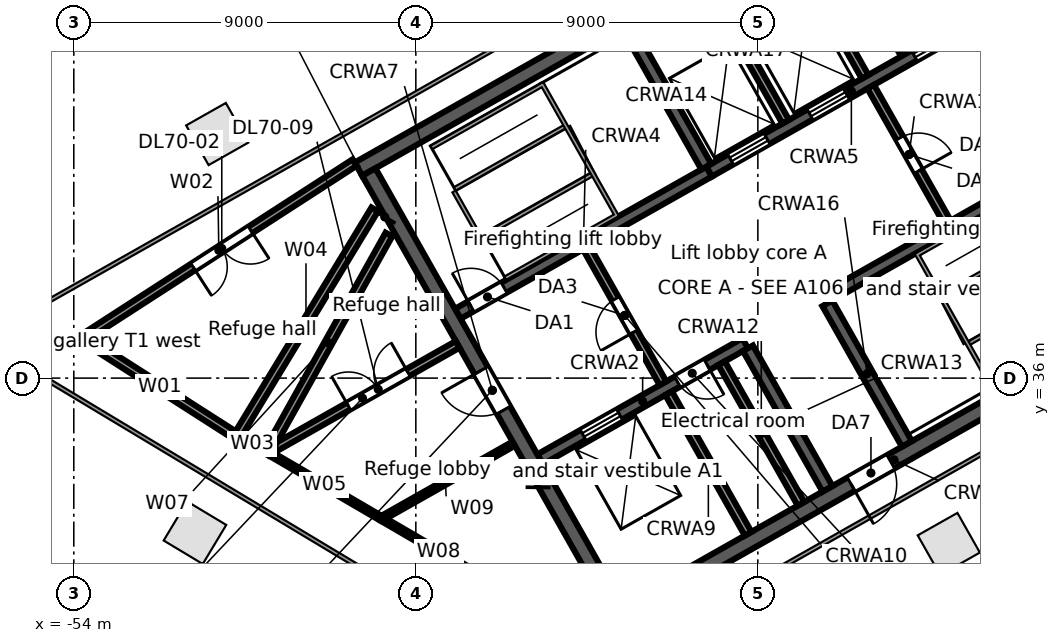
"""IFC4 building model, lengths in metres.
Left out: names, types, materials, properties, quantities, classifications, styles, units other than length and angle.
Written with IfcOpenShell. Run it as: python <this file> out.ifc"""

import sys

from ifc_helpers import new_model, si_unit, direction, frame, frame_2d, origin, origin_2d, place, context, subcontext, project, spatial, rectangle, extrude, element, fill, save


model = new_model("IFC4")
c1 = context("Model", 3, precision=1e-05, world=origin(), true_north=direction((0.0, 1.0)))
c2 = subcontext(c1, "Body", "Model", "MODEL_VIEW")
j1 = project(units=[si_unit("LENGTHUNIT", "METRE"), si_unit("PLANEANGLEUNIT", "RADIAN")], contexts=[c1])
p1 = place(None, origin())
s1 = spatial("IfcSite", under=j1, at=p1, CompositionType="ELEMENT")
p2 = place(p1, origin())
s2 = spatial("IfcBuilding", under=s1, at=p2, CompositionType="ELEMENT")
p3 = place(p2, frame((0.0, 0.0, 312.1)))
s3 = spatial("IfcBuildingStorey", under=s2, at=p3, CompositionType="ELEMENT", Elevation=312.1)
for number, where, z_axis, x_axis in (
    (1, (-50.226, 42.423, 0.0), (0.0, 0.0, 1.0), (-0.87, -0.492, 0.0)),
    (2, (-50.812, 31.931, 0.0), (0.0, 0.0, 1.0), (0.857, -0.515, 0.0)),
    (3, (-30.976, 31.635, 0.0), (0.0, 0.0, 1.0), (0.87, 0.492, 0.0)),
):
    element("IfcColumn", number, at=place(p3, frame(where, z_axis=z_axis, x_axis=x_axis)), inside=s3, PredefinedType="COLUMN", context=c2, shape_type="SweptSolid", body=[
        extrude(rectangle(XDim=1.2, YDim=1.2, at=origin_2d()), origin(), (0.0, 0.0, 1.0), 4.4),
    ])
p4 = place(p3, frame((-39.813, 29.662, 0.0), z_axis=(0.0, 0.0, 1.0), x_axis=(0.870350116061, 0.492433422375, 0.0)))
e4 = element("IfcWall", 4, at=p4, inside=s3, PredefinedType="SOLIDWALL", context=c2, shape_type="SweptSolid", body=[
    extrude(rectangle(XDim=17.0, YDim=0.4, at=frame_2d((8.5, 0.0))), origin(), (0.0, 0.0, 1.0), 4.12),
])
p5 = place(p4, frame((7.2, 0.0, 0.0)))
e5 = element("IfcOpeningElement", 5, at=p5, cuts=e4, PredefinedType="OPENING", context=c2, shape_type="SweptSolid", body=[
    extrude(rectangle(XDim=1.2, YDim=2.1, at=frame_2d((0.6, 1.05))), frame((0.0, 0.21, 0.0), z_axis=(0.0, -1.0, 0.0), x_axis=(1.0, 0.0, 0.0)), (0.0, 0.0, 1.0), 0.42),
])
p6 = place(p3, frame((-41.73, 33.863, 0.0), z_axis=(0.0, 0.0, 1.0), x_axis=(0.870350800578, 0.492432212525, 0.0)))
e6 = element("IfcWall", 6, at=p6, inside=s3, PredefinedType="SOLIDWALL", context=c2, shape_type="SweptSolid", body=[
    extrude(rectangle(XDim=6.2, YDim=0.3, at=frame_2d((3.1, 0.0))), origin(), (0.0, 0.0, 1.0), 4.12),
])
p7 = place(p6, frame((1.3, 0.0, 0.0)))
e7 = element("IfcOpeningElement", 7, at=p7, cuts=e6, PredefinedType="OPENING", context=c2, shape_type="SweptSolid", body=[
    extrude(rectangle(XDim=1.1, YDim=2.1, at=frame_2d((0.55, 1.05))), frame((0.0, 0.16, 0.0), z_axis=(0.0, -1.0, 0.0), x_axis=(1.0, 0.0, 0.0)), (0.0, 0.0, 1.0), 0.32),
])
p8 = place(p6, frame((4.15, 0.0, 0.0)))
e8 = element("IfcOpeningElement", 8, at=p8, cuts=e6, PredefinedType="OPENING", context=c2, shape_type="SweptSolid", body=[
    extrude(rectangle(XDim=0.9, YDim=2.1, at=frame_2d((0.45, 1.05))), frame((0.0, 0.16, 0.0), z_axis=(0.0, -1.0, 0.0), x_axis=(1.0, 0.0, 0.0)), (0.0, 0.0, 1.0), 0.32),
])
p9 = place(p3, frame((-34.245, 38.097, 0.0), z_axis=(0.0, 0.0, 1.0), x_axis=(0.870356351998, 0.492422400523, 0.0)))
e9 = element("IfcWall", 9, at=p9, inside=s3, PredefinedType="SOLIDWALL", context=c2, shape_type="SweptSolid", body=[
    extrude(rectangle(XDim=7.6, YDim=0.3, at=frame_2d((3.8, 0.0))), origin(), (0.0, 0.0, 1.0), 4.12),
])
p10 = place(p9, frame((6.2, 0.0, 0.0)))
e10 = element("IfcOpeningElement", 10, at=p10, cuts=e9, PredefinedType="OPENING", context=c2, shape_type="SweptSolid", body=[
    extrude(rectangle(XDim=1.0, YDim=2.1, at=frame_2d((0.5, 1.05))), frame((0.0, 0.16, 0.0), z_axis=(0.0, -1.0, 0.0), x_axis=(1.0, 0.0, 0.0)), (0.0, 0.0, 1.0), 0.32),
])
p11 = place(p3, frame((-43.897, 37.692, 0.0), z_axis=(0.0, 0.0, 1.0), x_axis=(0.870356351998, 0.492422400523, 0.0)))
e11 = element("IfcWall", 11, at=p11, inside=s3, PredefinedType="SOLIDWALL", context=c2, shape_type="SweptSolid", body=[
    extrude(rectangle(XDim=7.6, YDim=0.3, at=frame_2d((3.8, 0.0))), origin(), (0.0, 0.0, 1.0), 4.12),
])
p12 = place(p11, frame((0.4, 0.0, 0.0)))
e12 = element("IfcOpeningElement", 12, at=p12, cuts=e11, PredefinedType="OPENING", context=c2, shape_type="SweptSolid", body=[
    extrude(rectangle(XDim=1.0, YDim=2.1, at=frame_2d((0.5, 1.05))), frame((0.0, 0.16, 0.0), z_axis=(0.0, -1.0, 0.0), x_axis=(1.0, 0.0, 0.0)), (0.0, 0.0, 1.0), 0.32),
])
p13 = place(p3, frame((-37.282, 41.435, 0.0), z_axis=(0.0, 0.0, 1.0), x_axis=(0.870361315115, 0.492413628113, 0.0)))
e13 = element("IfcWall", 13, at=p13, inside=s3, PredefinedType="SOLIDWALL", context=c2, shape_type="SweptSolid", body=[
    extrude(rectangle(XDim=8.6, YDim=0.3, at=frame_2d((4.3, 0.0))), origin(), (0.0, 0.0, 1.0), 4.12),
])
p14 = place(p13, frame((0.65, 0.0, 0.0)))
e14 = element("IfcOpeningElement", 14, at=p14, cuts=e13, PredefinedType="OPENING", context=c2, shape_type="SweptSolid", body=[
    extrude(rectangle(XDim=1.1, YDim=2.1, at=frame_2d((0.55, 1.05))), frame((0.0, 0.16, 0.0), z_axis=(0.0, -1.0, 0.0), x_axis=(1.0, 0.0, 0.0)), (0.0, 0.0, 1.0), 0.32),
])
p15 = place(p13, frame((3.05, 0.0, 0.0)))
e15 = element("IfcOpeningElement", 15, at=p15, cuts=e13, PredefinedType="OPENING", context=c2, shape_type="SweptSolid", body=[
    extrude(rectangle(XDim=1.1, YDim=2.1, at=frame_2d((0.55, 1.05))), frame((0.0, 0.16, 0.0), z_axis=(0.0, -1.0, 0.0), x_axis=(1.0, 0.0, 0.0)), (0.0, 0.0, 1.0), 0.32),
])
p16 = place(p13, frame((6.2, 0.0, 0.0)))
e16 = element("IfcOpeningElement", 16, at=p16, cuts=e13, PredefinedType="OPENING", context=c2, shape_type="SweptSolid", body=[
    extrude(rectangle(XDim=1.1, YDim=2.1, at=frame_2d((0.55, 1.05))), frame((0.0, 0.16, 0.0), z_axis=(0.0, -1.0, 0.0), x_axis=(1.0, 0.0, 0.0)), (0.0, 0.0, 1.0), 0.32),
])
p17 = place(p3, frame((-46.51, 41.499, 0.0), z_axis=(0.0, 0.0, 1.0), x_axis=(0.870356271124, 0.492422543467, 0.0)))
e17 = element("IfcWall", 17, at=p17, inside=s3, PredefinedType="SOLIDWALL", context=c2, shape_type="SweptSolid", body=[
    extrude(rectangle(XDim=17.0, YDim=0.4, at=frame_2d((8.5, 0.0))), origin(), (0.0, 0.0, 1.0), 4.12),
])
p18 = place(p3, frame((-46.238, 41.423, 0.0), z_axis=(0.0, 0.0, 1.0), x_axis=(0.492421663121, -0.870356769198, 0.0)))
e18 = element("IfcWall", 18, at=p18, inside=s3, PredefinedType="SOLIDWALL", context=c2, shape_type="SweptSolid", body=[
    extrude(rectangle(XDim=13.2, YDim=0.4, at=frame_2d((6.6, 0.0))), origin(), (0.0, 0.0, 1.0), 4.12),
])
p19 = place(p18, frame((6.0, 0.0, 0.0)))
e19 = element("IfcOpeningElement", 19, at=p19, cuts=e18, PredefinedType="OPENING", context=c2, shape_type="SweptSolid", body=[
    extrude(rectangle(XDim=1.2, YDim=2.1, at=frame_2d((0.6, 1.05))), frame((0.0, 0.21, 0.0), z_axis=(0.0, -1.0, 0.0), x_axis=(1.0, 0.0, 0.0)), (0.0, 0.0, 1.0), 0.42),
])
p20 = place(p3, frame((-38.349, 35.603, 0.0), z_axis=(0.0, 0.0, 1.0), x_axis=(0.492397924348, -0.870370199454, 0.0)))
e20 = element("IfcWall", 20, at=p20, inside=s3, PredefinedType="SOLIDWALL", context=c2, shape_type="SweptSolid", body=[
    extrude(rectangle(XDim=4.25, YDim=0.2, at=frame_2d((2.125, 0.0))), origin(), (0.0, 0.0, 1.0), 4.12),
])
p21 = place(p3, frame((-40.516, 39.433, 0.0), z_axis=(0.0, 0.0, 1.0), x_axis=(0.492453559952, -0.87033872216, 0.0)))
e21 = element("IfcWall", 21, at=p21, inside=s3, PredefinedType="PARTITIONING", context=c2, shape_type="SweptSolid", body=[
    extrude(rectangle(XDim=4.1, YDim=0.2, at=frame_2d((2.05, 0.0))), origin(), (0.0, 0.0, 1.0), 4.12),
])
p22 = place(p21, frame((1.55, 0.0, 0.0)))
e22 = element("IfcOpeningElement", 22, at=p22, cuts=e21, PredefinedType="OPENING", context=c2, shape_type="SweptSolid", body=[
    extrude(rectangle(XDim=1.0, YDim=2.1, at=frame_2d((0.5, 1.05))), frame((0.0, 0.11, 0.0), z_axis=(0.0, -1.0, 0.0), x_axis=(1.0, 0.0, 0.0)), (0.0, 0.0, 1.0), 0.22),
])
p23 = place(p3, frame((-36.956, 36.391, 0.0), z_axis=(0.0, 0.0, 1.0), x_axis=(0.492397924348, -0.870370199454, 0.0)))
e23 = element("IfcWall", 23, at=p23, inside=s3, PredefinedType="SOLIDWALL", context=c2, shape_type="SweptSolid", body=[
    extrude(rectangle(XDim=4.25, YDim=0.2, at=frame_2d((2.125, 0.0))), origin(), (0.0, 0.0, 1.0), 4.12),
])
for number, where, z_axis, x_axis in (
    (24, (-36.26, 36.785, 0.0), (0.0, 0.0, 1.0), (0.492, -0.87, 0.0)),
    (25, (-39.449, 45.264, 0.0), (0.0, 0.0, 1.0), (0.492, -0.87, 0.0)),
    (26, (-34.171, 37.967, 0.0), (0.0, 0.0, 1.0), (0.492, -0.87, 0.0)),
):
    element("IfcWall", number, at=place(p3, frame(where, z_axis=z_axis, x_axis=x_axis)), inside=s3, PredefinedType="SOLIDWALL", context=c2, shape_type="SweptSolid", body=[
        extrude(rectangle(XDim=4.25, YDim=0.3, at=frame_2d((2.125, 0.0))), origin(), (0.0, 0.0, 1.0), 4.12),
    ])
p24 = place(p3, frame((-37.36, 46.446, 0.0), z_axis=(0.0, 0.0, 1.0), x_axis=(0.492422543467, -0.870356271124, 0.0)))
e27 = element("IfcWall", 27, at=p24, inside=s3, PredefinedType="SOLIDWALL", context=c2, shape_type="SweptSolid", body=[
    extrude(rectangle(XDim=4.25, YDim=0.2, at=frame_2d((2.125, 0.0))), origin(), (0.0, 0.0, 1.0), 4.12),
])
p25 = place(p3, frame((-33.031, 43.667, 0.0), z_axis=(0.0, 0.0, 1.0), x_axis=(0.492408451753, -0.87036424366, 0.0)))
e28 = element("IfcWall", 28, at=p25, inside=s3, PredefinedType="PARTITIONING", context=c2, shape_type="SweptSolid", body=[
    extrude(rectangle(XDim=4.1, YDim=0.2, at=frame_2d((2.05, 0.0))), origin(), (0.0, 0.0, 1.0), 4.12),
])
p26 = place(p25, frame((1.55, 0.0, 0.0)))
e29 = element("IfcOpeningElement", 29, at=p26, cuts=e28, PredefinedType="OPENING", context=c2, shape_type="SweptSolid", body=[
    extrude(rectangle(XDim=1.0, YDim=2.1, at=frame_2d((0.5, 1.05))), frame((0.0, 0.11, 0.0), z_axis=(0.0, -1.0, 0.0), x_axis=(1.0, 0.0, 0.0)), (0.0, 0.0, 1.0), 0.22),
])
p27 = place(p3, frame((-35.271, 47.628, 0.0), z_axis=(0.0, 0.0, 1.0), x_axis=(0.492422543467, -0.870356271124, 0.0)))
e30 = element("IfcWall", 30, at=p27, inside=s3, PredefinedType="SOLIDWALL", context=c2, shape_type="SweptSolid", body=[
    extrude(rectangle(XDim=4.25, YDim=0.2, at=frame_2d((2.125, 0.0))), origin(), (0.0, 0.0, 1.0), 4.12),
])
p28 = place(p3, frame((-31.79, 49.597, 0.0), z_axis=(0.0, 0.0, 1.0), x_axis=(0.492421663121, -0.870356769198, 0.0)))
e31 = element("IfcWall", 31, at=p28, inside=s3, PredefinedType="SOLIDWALL", context=c2, shape_type="SweptSolid", body=[
    extrude(rectangle(XDim=13.2, YDim=0.4, at=frame_2d((6.6, 0.0))), origin(), (0.0, 0.0, 1.0), 4.12),
])
p29 = place(p28, frame((6.0, 0.0, 0.0)))
e32 = element("IfcOpeningElement", 32, at=p29, cuts=e31, PredefinedType="OPENING", context=c2, shape_type="SweptSolid", body=[
    extrude(rectangle(XDim=1.2, YDim=2.1, at=frame_2d((0.6, 1.05))), frame((0.0, 0.21, 0.0), z_axis=(0.0, -1.0, 0.0), x_axis=(1.0, 0.0, 0.0)), (0.0, 0.0, 1.0), 0.42),
])
p30 = place(p3, frame((-53.76, 37.052, 0.0), z_axis=(0.0, 0.0, 1.0), x_axis=(0.842421660073, -0.538818843992, 0.0)))
e33 = element("IfcWall", 33, at=p30, inside=s3, PredefinedType="PARTITIONING", context=c2, shape_type="SweptSolid", body=[
    extrude(rectangle(XDim=4.809, YDim=0.2, at=frame_2d((2.404, 0.0))), origin(), (0.0, 0.0, 1.0), 4.12),
])
p31 = place(p3, frame((-53.76, 37.052, 0.0), z_axis=(0.0, 0.0, 1.0), x_axis=(0.83989696129, 0.542745883831, 0.0)))
e34 = element("IfcWall", 34, at=p31, inside=s3, PredefinedType="PARTITIONING", context=c2, shape_type="SweptSolid", body=[
    extrude(rectangle(XDim=8.514, YDim=0.2, at=frame_2d((4.257, 0.0))), origin(), (0.0, 0.0, 1.0), 4.12),
])
p32 = place(p31, frame((3.45, 0.0, 0.0)))
e35 = element("IfcOpeningElement", 35, at=p32, cuts=e34, PredefinedType="OPENING", context=c2, shape_type="SweptSolid", body=[
    extrude(rectangle(XDim=1.8, YDim=2.1, at=frame_2d((0.9, 1.05))), frame((0.0, 0.11, 0.0), z_axis=(0.0, -1.0, 0.0), x_axis=(1.0, 0.0, 0.0)), (0.0, 0.0, 1.0), 0.22),
])
p33 = place(p3, frame((-49.7, 34.456, 0.0), z_axis=(0.0, 0.0, 1.0), x_axis=(0.892589601947, -0.450870050564, 0.0)))
e36 = element("IfcWall", 36, at=p33, inside=s3, PredefinedType="PARTITIONING", context=c2, shape_type="SweptSolid", body=[
    extrude(rectangle(XDim=0.88, YDim=0.125, at=frame_2d((0.44, 0.0))), origin(), (0.0, 0.0, 1.0), 3.886),
])
p34 = place(p3, frame((-49.699, 34.478, 0.0), z_axis=(0.0, 0.0, 1.0), x_axis=(0.51880997965, 0.854889586447, 0.0)))
e37 = element("IfcWall", 37, at=p34, inside=s3, PredefinedType="PARTITIONING", context=c2, shape_type="SweptSolid", body=[
    extrude(rectangle(XDim=6.972, YDim=0.2, at=frame_2d((3.486, 0.0))), origin(), (0.0, 0.0, 1.0), 4.12),
])
p35 = place(p3, frame((-48.905, 34.054, 0.0), z_axis=(0.0, 0.0, 1.0), x_axis=(0.863972582591, -0.50353885305, 0.0)))
e38 = element("IfcWall", 38, at=p35, inside=s3, PredefinedType="PARTITIONING", context=c2, shape_type="SweptSolid", body=[
    extrude(rectangle(XDim=3.473, YDim=0.125, at=frame_2d((1.737, 0.0))), origin(), (0.0, 0.0, 1.0), 3.4),
])
p36 = place(p3, frame((-48.905, 34.054, 0.0), z_axis=(0.0, 0.0, 1.0), x_axis=(0.870335821512, 0.492458686383, 0.0)))
e39 = element("IfcWall", 39, at=p36, inside=s3, PredefinedType="PARTITIONING", context=c2, shape_type="SweptSolid", body=[
    extrude(rectangle(XDim=5.751, YDim=0.2, at=frame_2d((2.875, 0.0))), origin(), (0.0, 0.0, 1.0), 4.12),
])
p37 = place(p36, frame((2.45, 0.0, 0.0)))
e40 = element("IfcOpeningElement", 40, at=p37, cuts=e39, PredefinedType="OPENING", context=c2, shape_type="SweptSolid", body=[
    extrude(rectangle(XDim=1.8, YDim=2.1, at=frame_2d((0.9, 1.05))), frame((0.0, 0.11, 0.0), z_axis=(0.0, -1.0, 0.0), x_axis=(1.0, 0.0, 0.0)), (0.0, 0.0, 1.0), 0.22),
])
p38 = place(p3, frame((-48.891, 34.08, 0.0), z_axis=(0.0, 0.0, 1.0), x_axis=(0.487518696873, 0.873112547269, 0.0)))
e41 = element("IfcWall", 41, at=p38, inside=s3, PredefinedType="PARTITIONING", context=c2, shape_type="SweptSolid", body=[
    extrude(rectangle(XDim=6.527, YDim=0.2, at=frame_2d((3.264, 0.0))), origin(), (0.0, 0.0, 1.0), 4.12),
])
p39 = place(p3, frame((-45.894, 32.299, 0.0), z_axis=(0.0, 0.0, 1.0), x_axis=(0.863904238122, -0.503656100285, 0.0)))
e42 = element("IfcWall", 42, at=p39, inside=s3, PredefinedType="PARTITIONING", context=c2, shape_type="SweptSolid", body=[
    extrude(rectangle(XDim=3.461, YDim=0.125, at=frame_2d((1.73, 0.0))), origin(), (0.0, 0.0, 1.0), 4.12),
])
p40 = place(p3, frame((-45.886, 32.316, 0.0), z_axis=(0.0, 0.0, 1.0), x_axis=(0.870373922462, 0.492391343444, 0.0)))
e43 = element("IfcWall", 43, at=p40, inside=s3, PredefinedType="PARTITIONING", context=c2, shape_type="SweptSolid", body=[
    extrude(rectangle(XDim=3.828, YDim=0.125, at=frame_2d((1.914, 0.0))), origin(), (0.0, 0.0, 1.0), 4.12),
])
p41 = place(p14, origin())
e44 = element("IfcDoor", 44, at=p41, inside=s3, OperationType="DOUBLE_DOOR_SLIDING", PredefinedType="DOOR", context=c2, shape_type="SweptSolid", body=[
    extrude(rectangle(XDim=1.1, YDim=2.1, at=frame_2d((0.55, 1.05))), frame((0.0, 0.025, 0.0), z_axis=(0.0, -1.0, 0.0), x_axis=(1.0, 0.0, 0.0)), (0.0, 0.0, 1.0), 0.05),
])
fill(e14, e44)
p42 = place(p15, origin())
e45 = element("IfcDoor", 45, at=p42, inside=s3, OperationType="DOUBLE_DOOR_SLIDING", PredefinedType="DOOR", context=c2, shape_type="SweptSolid", body=[
    extrude(rectangle(XDim=1.1, YDim=2.1, at=frame_2d((0.55, 1.05))), frame((0.0, 0.025, 0.0), z_axis=(0.0, -1.0, 0.0), x_axis=(1.0, 0.0, 0.0)), (0.0, 0.0, 1.0), 0.05),
])
fill(e15, e45)
p43 = place(p16, origin())
e46 = element("IfcDoor", 46, at=p43, inside=s3, OperationType="DOUBLE_DOOR_SLIDING", PredefinedType="DOOR", context=c2, shape_type="SweptSolid", body=[
    extrude(rectangle(XDim=1.1, YDim=2.1, at=frame_2d((0.55, 1.05))), frame((0.0, 0.025, 0.0), z_axis=(0.0, -1.0, 0.0), x_axis=(1.0, 0.0, 0.0)), (0.0, 0.0, 1.0), 0.05),
])
fill(e16, e46)
p44 = place(p7, origin())
e47 = element("IfcDoor", 47, at=p44, inside=s3, OperationType="DOUBLE_DOOR_SLIDING", PredefinedType="DOOR", context=c2, shape_type="SweptSolid", body=[
    extrude(rectangle(XDim=1.1, YDim=2.1, at=frame_2d((0.55, 1.05))), frame((0.0, 0.025, 0.0), z_axis=(0.0, -1.0, 0.0), x_axis=(1.0, 0.0, 0.0)), (0.0, 0.0, 1.0), 0.05),
])
fill(e7, e47)
p45 = place(p12, origin())
e48 = element("IfcDoor", 48, at=p45, inside=s3, OperationType="SINGLE_SWING_LEFT", PredefinedType="DOOR", context=c2, shape_type="SweptSolid", body=[
    extrude(rectangle(XDim=1.0, YDim=2.1, at=frame_2d((0.5, 1.05))), frame((0.0, 0.025, 0.0), z_axis=(0.0, -1.0, 0.0), x_axis=(1.0, 0.0, 0.0)), (0.0, 0.0, 1.0), 0.05),
])
fill(e12, e48)
p46 = place(p22, frame((1.0, 0.0, 0.0), z_axis=(0.0, 0.0, 1.0), x_axis=(-1.0, 0.0, 0.0)))
e49 = element("IfcDoor", 49, at=p46, inside=s3, OperationType="SINGLE_SWING_LEFT", PredefinedType="DOOR", context=c2, shape_type="SweptSolid", body=[
    extrude(rectangle(XDim=1.0, YDim=2.1, at=frame_2d((0.5, 1.05))), frame((0.0, 0.025, 0.0), z_axis=(0.0, -1.0, 0.0), x_axis=(1.0, 0.0, 0.0)), (0.0, 0.0, 1.0), 0.05),
])
fill(e22, e49)
p47 = place(p19, frame((1.2, 0.0, 0.0), z_axis=(0.0, 0.0, 1.0), x_axis=(-1.0, 0.0, 0.0)))
e50 = element("IfcDoor", 50, at=p47, inside=s3, OperationType="SINGLE_SWING_RIGHT", PredefinedType="DOOR", context=c2, shape_type="SweptSolid", body=[
    extrude(rectangle(XDim=1.2, YDim=2.1, at=frame_2d((0.6, 1.05))), frame((0.0, 0.025, 0.0), z_axis=(0.0, -1.0, 0.0), x_axis=(1.0, 0.0, 0.0)), (0.0, 0.0, 1.0), 0.05),
])
fill(e19, e50)
p48 = place(p26, origin())
e51 = element("IfcDoor", 51, at=p48, inside=s3, OperationType="SINGLE_SWING_RIGHT", PredefinedType="DOOR", context=c2, shape_type="SweptSolid", body=[
    extrude(rectangle(XDim=1.0, YDim=2.1, at=frame_2d((0.5, 1.05))), frame((0.0, 0.025, 0.0), z_axis=(0.0, -1.0, 0.0), x_axis=(1.0, 0.0, 0.0)), (0.0, 0.0, 1.0), 0.05),
])
fill(e29, e51)
p49 = place(p5, frame((1.2, 0.0, 0.0), z_axis=(0.0, 0.0, 1.0), x_axis=(-1.0, 0.0, 0.0)))
e52 = element("IfcDoor", 52, at=p49, inside=s3, OperationType="SINGLE_SWING_RIGHT", PredefinedType="DOOR", context=c2, shape_type="SweptSolid", body=[
    extrude(rectangle(XDim=1.2, YDim=2.1, at=frame_2d((0.6, 1.05))), frame((0.0, 0.025, 0.0), z_axis=(0.0, -1.0, 0.0), x_axis=(1.0, 0.0, 0.0)), (0.0, 0.0, 1.0), 0.05),
])
fill(e5, e52)
p50 = place(p8, frame((0.9, 0.0, 0.0), z_axis=(0.0, 0.0, 1.0), x_axis=(-1.0, 0.0, 0.0)))
e53 = element("IfcDoor", 53, at=p50, inside=s3, OperationType="SINGLE_SWING_LEFT", PredefinedType="DOOR", context=c2, shape_type="SweptSolid", body=[
    extrude(rectangle(XDim=0.9, YDim=2.1, at=frame_2d((0.45, 1.05))), frame((0.0, 0.025, 0.0), z_axis=(0.0, -1.0, 0.0), x_axis=(1.0, 0.0, 0.0)), (0.0, 0.0, 1.0), 0.05),
])
fill(e8, e53)
p51 = place(p32, frame((1.8, 0.0, 0.0), z_axis=(0.0, 0.0, 1.0), x_axis=(-1.0, 0.0, 0.0)))
e54 = element("IfcDoor", 54, at=p51, inside=s3, OperationType="DOUBLE_DOOR_SINGLE_SWING", PredefinedType="DOOR", context=c2, shape_type="SweptSolid", body=[
    extrude(rectangle(XDim=1.8, YDim=2.1, at=frame_2d((0.9, 1.05))), frame((0.0, 0.025, 0.0), z_axis=(0.0, -1.0, 0.0), x_axis=(1.0, 0.0, 0.0)), (0.0, 0.0, 1.0), 0.05),
])
fill(e35, e54)
p52 = place(p37, origin())
e55 = element("IfcDoor", 55, at=p52, inside=s3, OperationType="DOUBLE_DOOR_SINGLE_SWING", PredefinedType="DOOR", context=c2, shape_type="SweptSolid", body=[
    extrude(rectangle(XDim=1.8, YDim=2.1, at=frame_2d((0.9, 1.05))), frame((0.0, 0.025, 0.0), z_axis=(0.0, -1.0, 0.0), x_axis=(1.0, 0.0, 0.0)), (0.0, 0.0, 1.0), 0.05),
])
fill(e40, e55)
save(model, sys.argv[1])
